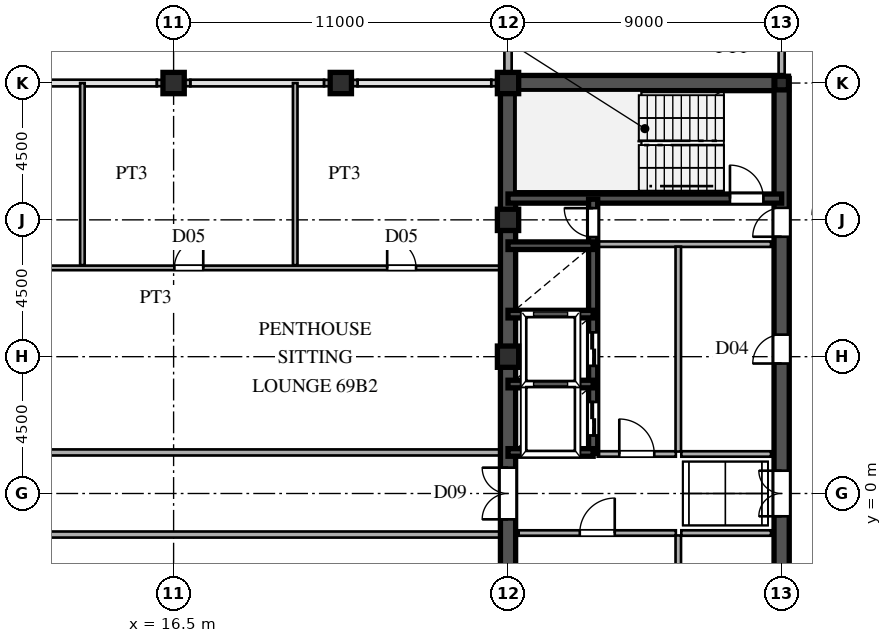
"""IFC4 building model, lengths in metres.
Left out: names, types, materials, properties, quantities, classifications, styles, units other than length and angle.
Written with IfcOpenShell. Run it as: python <this file> out.ifc"""

import sys

from ifc_helpers import new_model, si_unit, direction, frame, frame_2d, origin, origin_2d, place, context, subcontext, project, spatial, rectangle, hollow_rectangle, i_section, extrude, source, transform, mapped, element, fill, save


model = new_model("IFC4")
c1 = context("Model", 3, precision=1e-05, world=origin(), true_north=direction((0.0, 1.0)))
c2 = subcontext(c1, "Body", "Model", "MODEL_VIEW")
j1 = project(units=[si_unit("LENGTHUNIT", "METRE"), si_unit("PLANEANGLEUNIT", "RADIAN")], contexts=[c1])
p1 = place(None, origin())
s1 = spatial("IfcSite", under=j1, at=p1, CompositionType="ELEMENT")
p2 = place(p1, origin())
s2 = spatial("IfcBuilding", under=s1, at=p2, CompositionType="ELEMENT")
p3 = place(p2, frame((0.0, 0.0, 261.9)))
s3 = spatial("IfcBuildingStorey", under=s2, at=p3, CompositionType="ELEMENT", Elevation=261.9)
m1 = source(origin(), c2, "Body", "SweptSolid", [
    extrude(hollow_rectangle(XDim=0.7, YDim=0.7, WallThickness=0.03, at=origin_2d()), origin(), (0.0, 0.0, 1.0), 3.75),
])
for number, where, z_axis, x_axis in (
    (1, (27.5, 4.5, 0.0), (0.0, 0.0, 1.0), (1.0, 0.0, 0.0)),
    (2, (27.5, 9.0, 0.0), (0.0, 0.0, 1.0), (1.0, 0.0, 0.0)),
    (3, (27.5, 13.5, 0.0), (0.0, 0.0, 1.0), (1.0, 0.0, 0.0)),
):
    element("IfcColumn", number, at=place(p3, frame(where, z_axis=z_axis, x_axis=x_axis)), inside=s3, PredefinedType="COLUMN", context=c2, shape_type="MappedRepresentation", body=[
        mapped(m1, transform((0.0, 0.0, 0.0), scale=1.0)),
    ])
m2 = source(origin(), c2, "Body", "SweptSolid", [
    extrude(i_section(OverallWidth=0.45, OverallDepth=0.45, WebThickness=0.016, FlangeThickness=0.025, at=origin_2d()), origin(), (0.0, 0.0, 1.0), 3.75),
])
p4 = place(p3, frame((36.5, 13.5, 0.0), z_axis=(0.0, 0.0, 1.0), x_axis=(1.0, 0.0, 0.0)))
e4 = element("IfcColumn", 4, at=p4, inside=s3, PredefinedType="COLUMN", context=c2, shape_type="MappedRepresentation", body=[
    mapped(m2, transform((0.0, 0.0, 0.0), scale=1.0)),
])
for number, where, z_axis, x_axis in (
    (5, (16.5, 13.5, 0.0), (0.0, 0.0, 1.0), (1.0, 0.0, 0.0)),
    (6, (22.0, 13.5, 0.0), (0.0, 0.0, 1.0), (1.0, 0.0, 0.0)),
):
    element("IfcColumn", number, at=place(p3, frame(where, z_axis=z_axis, x_axis=x_axis)), inside=s3, PredefinedType="COLUMN", context=c2, shape_type="MappedRepresentation", body=[
        mapped(m1, transform((0.0, 0.0, 0.0), scale=1.0)),
    ])
p5 = place(p3, frame((27.5, 13.755, 0.0), z_axis=(0.0, 0.0, 1.0), x_axis=(0.0, 1.0, 0.0)))
e7 = element("IfcWall", 7, at=p5, inside=s3, PredefinedType="SOLIDWALL", context=c2, shape_type="SweptSolid", body=[
    extrude(rectangle(XDim=0.62, YDim=0.24, at=frame_2d((0.31, 0.0))), origin(), (0.0, 0.0, 1.0), 3.03),
])
p6 = place(p3, frame((27.5, 14.375, 0.0), z_axis=(0.0, 0.0, 1.0), x_axis=(0.0, 1.0, 0.0)))
e8 = element("IfcWall", 8, at=p6, inside=s3, PredefinedType="SOLIDWALL", context=c2, shape_type="SweptSolid", body=[
    extrude(rectangle(XDim=1.605, YDim=0.24, at=frame_2d((0.803, 0.0))), origin(), (0.0, 0.0, 1.0), 3.53),
])
for number, where, z_axis, x_axis in (
    (9, (15.95, 13.5, 0.0), (0.0, 0.0, 1.0), (1.0, 0.0, 0.0)),
    (10, (21.45, 13.5, 0.0), (0.0, 0.0, 1.0), (1.0, 0.0, 0.0)),
):
    element("IfcWall", number, at=place(p3, frame(where, z_axis=z_axis, x_axis=x_axis)), inside=s3, PredefinedType="SOLIDWALL", context=c2, shape_type="SweptSolid", body=[
        extrude(rectangle(XDim=1.1, YDim=0.21, at=frame_2d((0.55, 0.0))), origin(), (0.0, 0.0, 1.0), 3.03),
    ])
p7 = place(p3, frame((26.95, 13.5, 0.0), z_axis=(0.0, 0.0, 1.0), x_axis=(1.0, 0.0, 0.0)))
e11 = element("IfcWall", 11, at=p7, inside=s3, PredefinedType="SOLIDWALL", context=c2, shape_type="SweptSolid", body=[
    extrude(rectangle(XDim=0.54, YDim=0.21, at=frame_2d((0.27, 0.0))), origin(), (0.0, 0.0, 1.0), 3.03),
])
for number, where, z_axis, x_axis in (
    (12, (27.5, -13.5, 0.0), (0.0, 0.0, 1.0), (0.0, 1.0, 0.0)),
    (13, (27.5, 1.3, 0.0), (0.0, 0.0, 1.0), (0.0, 1.0, 0.0)),
):
    element("IfcWall", number, at=place(p3, frame(where, z_axis=z_axis, x_axis=x_axis)), inside=s3, PredefinedType="SHEAR", context=c2, shape_type="SweptSolid", body=[
        extrude(rectangle(XDim=12.2, YDim=0.5, at=frame_2d((6.1, 0.0))), origin(), (0.0, 0.0, 1.0), 3.53),
    ])
p8 = place(p3, frame((27.5, -1.3, 0.0), z_axis=(0.0, 0.0, 1.0), x_axis=(0.0, 1.0, 0.0)))
e14 = element("IfcWall", 14, at=p8, inside=s3, PredefinedType="SHEAR", context=c2, shape_type="SweptSolid", body=[
    extrude(rectangle(XDim=2.6, YDim=0.5, at=frame_2d((1.3, 0.0))), origin(), (0.0, 0.0, 1.0), 3.53),
])
p9 = place(p8, frame((0.45, 0.0, 0.0)))
e15 = element("IfcOpeningElement", 15, at=p9, cuts=e14, PredefinedType="OPENING", context=c2, shape_type="SweptSolid", body=[
    extrude(rectangle(XDim=1.7, YDim=2.35, at=frame_2d((0.85, 1.175))), frame((0.0, 0.26, 0.0), z_axis=(0.0, -1.0, 0.0), x_axis=(1.0, 0.0, 0.0)), (0.0, 0.0, 1.0), 0.52),
])
p10 = place(p3, frame((27.5, 13.5, 0.0), z_axis=(0.0, 0.0, 1.0), x_axis=(1.0, 0.0, 0.0)))
e16 = element("IfcWall", 16, at=p10, inside=s3, PredefinedType="SHEAR", context=c2, shape_type="SweptSolid", body=[
    extrude(rectangle(XDim=9.0, YDim=0.5, at=frame_2d((4.5, 0.0))), origin(), (0.0, 0.0, 1.0), 3.53),
])
p11 = place(p3, frame((36.5, -1.3, 0.0), z_axis=(0.0, 0.0, 1.0), x_axis=(0.0, 1.0, 0.0)))
e17 = element("IfcWall", 17, at=p11, inside=s3, PredefinedType="SHEAR", context=c2, shape_type="SweptSolid", body=[
    extrude(rectangle(XDim=2.6, YDim=0.5, at=frame_2d((1.3, 0.0))), origin(), (0.0, 0.0, 1.0), 3.53),
])
p12 = place(p11, frame((0.55, 0.0, 0.0)))
e18 = element("IfcOpeningElement", 18, at=p12, cuts=e17, PredefinedType="OPENING", context=c2, shape_type="SweptSolid", body=[
    extrude(rectangle(XDim=1.5, YDim=2.3, at=frame_2d((0.75, 1.15))), frame((0.0, 0.26, 0.0), z_axis=(0.0, -1.0, 0.0), x_axis=(1.0, 0.0, 0.0)), (0.0, 0.0, 1.0), 0.52),
])
p13 = place(p3, frame((36.5, 8.2, 0.0), z_axis=(0.0, 0.0, 1.0), x_axis=(0.0, 1.0, 0.0)))
e19 = element("IfcWall", 19, at=p13, inside=s3, PredefinedType="SHEAR", context=c2, shape_type="SweptSolid", body=[
    extrude(rectangle(XDim=5.45, YDim=0.5, at=frame_2d((2.725, 0.0))), origin(), (0.0, 0.0, 1.0), 3.53),
])
p14 = place(p13, frame((0.245, 0.0, 0.0)))
e20 = element("IfcOpeningElement", 20, at=p14, cuts=e19, PredefinedType="OPENING", context=c2, shape_type="SweptSolid", body=[
    extrude(rectangle(XDim=0.95, YDim=2.15, at=frame_2d((0.475, 1.075))), frame((0.0, 0.26, 0.0), z_axis=(0.0, -1.0, 0.0), x_axis=(1.0, 0.0, 0.0)), (0.0, 0.0, 1.0), 0.52),
])
p15 = place(p3, frame((36.5, -6.5, 0.0), z_axis=(0.0, 0.0, 1.0), x_axis=(0.0, 1.0, 0.0)))
e21 = element("IfcWall", 21, at=p15, inside=s3, PredefinedType="SHEAR", context=c2, shape_type="SweptSolid", body=[
    extrude(rectangle(XDim=5.2, YDim=0.5, at=frame_2d((2.6, 0.0))), origin(), (0.0, 0.0, 1.0), 3.53),
])
p16 = place(p15, frame((2.125, 0.0, 0.0)))
e22 = element("IfcOpeningElement", 22, at=p16, cuts=e21, PredefinedType="OPENING", context=c2, shape_type="SweptSolid", body=[
    extrude(rectangle(XDim=0.95, YDim=2.15, at=frame_2d((0.475, 1.075))), frame((0.0, 0.26, 0.0), z_axis=(0.0, -1.0, 0.0), x_axis=(1.0, 0.0, 0.0)), (0.0, 0.0, 1.0), 0.52),
])
p17 = place(p3, frame((36.5, 1.3, 0.0), z_axis=(0.0, 0.0, 1.0), x_axis=(0.0, 1.0, 0.0)))
e23 = element("IfcWall", 23, at=p17, inside=s3, PredefinedType="SHEAR", context=c2, shape_type="SweptSolid", body=[
    extrude(rectangle(XDim=6.9, YDim=0.5, at=frame_2d((3.45, 0.0))), origin(), (0.0, 0.0, 1.0), 3.53),
])
p18 = place(p17, frame((2.975, 0.0, 0.0)))
e24 = element("IfcOpeningElement", 24, at=p18, cuts=e23, PredefinedType="OPENING", context=c2, shape_type="SweptSolid", body=[
    extrude(rectangle(XDim=0.95, YDim=2.15, at=frame_2d((0.475, 1.075))), frame((0.0, 0.26, 0.0), z_axis=(0.0, -1.0, 0.0), x_axis=(1.0, 0.0, 0.0)), (0.0, 0.0, 1.0), 0.52),
])
p19 = place(p3, frame((27.5, 9.7, 0.0), z_axis=(0.0, 0.0, 1.0), x_axis=(1.0, 0.0, 0.0)))
e25 = element("IfcWall", 25, at=p19, inside=s3, PredefinedType="SHEAR", context=c2, shape_type="SweptSolid", body=[
    extrude(rectangle(XDim=9.0, YDim=0.3, at=frame_2d((4.5, 0.0))), origin(), (0.0, 0.0, 1.0), 3.53),
])
p20 = place(p19, frame((7.3, 0.0, 0.0)))
e26 = element("IfcOpeningElement", 26, at=p20, cuts=e25, PredefinedType="OPENING", context=c2, shape_type="SweptSolid", body=[
    extrude(rectangle(XDim=1.1, YDim=2.2, at=frame_2d((0.55, 1.1))), frame((0.0, 0.16, 0.0), z_axis=(0.0, -1.0, 0.0), x_axis=(1.0, 0.0, 0.0)), (0.0, 0.0, 1.0), 0.32),
])
for number, where, z_axis, x_axis in (
    (27, (27.5, 1.35, 0.0), (0.0, 0.0, 1.0), (1.0, 0.0, 0.0)),
    (28, (27.5, 3.6, 0.0), (0.0, 0.0, 1.0), (1.0, 0.0, 0.0)),
    (29, (27.5, 5.9, 0.0), (0.0, 0.0, 1.0), (1.0, 0.0, 0.0)),
    (30, (27.5, 8.15, 0.0), (0.0, 0.0, 1.0), (1.0, 0.0, 0.0)),
):
    element("IfcWall", number, at=place(p3, frame(where, z_axis=z_axis, x_axis=x_axis)), inside=s3, PredefinedType="SHEAR", context=c2, shape_type="SweptSolid", body=[
        extrude(rectangle(XDim=2.8, YDim=0.25, at=frame_2d((1.4, 0.0))), origin(), (0.0, 0.0, 1.0), 3.53),
    ])
p21 = place(p3, frame((30.3, 1.32, 0.0), z_axis=(0.0, 0.0, 1.0), x_axis=(0.0, 1.0, 0.0)))
e31 = element("IfcWall", 31, at=p21, inside=s3, PredefinedType="SHEAR", context=c2, shape_type="SweptSolid", body=[
    extrude(rectangle(XDim=2.28, YDim=0.3, at=frame_2d((1.14, 0.0))), origin(), (0.0, 0.0, 1.0), 3.53),
])
p22 = place(p21, frame((0.59, 0.0, 0.0)))
e32 = element("IfcOpeningElement", 32, at=p22, cuts=e31, PredefinedType="OPENING", context=c2, shape_type="SweptSolid", body=[
    extrude(rectangle(XDim=1.1, YDim=2.2, at=frame_2d((0.55, 1.1))), frame((0.0, 0.16, 0.0), z_axis=(0.0, -1.0, 0.0), x_axis=(1.0, 0.0, 0.0)), (0.0, 0.0, 1.0), 0.32),
])
p23 = place(p3, frame((30.3, 3.6, 0.0), z_axis=(0.0, 0.0, 1.0), x_axis=(0.0, 1.0, 0.0)))
e33 = element("IfcWall", 33, at=p23, inside=s3, PredefinedType="SHEAR", context=c2, shape_type="SweptSolid", body=[
    extrude(rectangle(XDim=2.3, YDim=0.3, at=frame_2d((1.15, 0.0))), origin(), (0.0, 0.0, 1.0), 3.53),
])
p24 = place(p23, frame((0.6, 0.0, 0.0)))
e34 = element("IfcOpeningElement", 34, at=p24, cuts=e33, PredefinedType="OPENING", context=c2, shape_type="SweptSolid", body=[
    extrude(rectangle(XDim=1.1, YDim=2.2, at=frame_2d((0.55, 1.1))), frame((0.0, 0.16, 0.0), z_axis=(0.0, -1.0, 0.0), x_axis=(1.0, 0.0, 0.0)), (0.0, 0.0, 1.0), 0.32),
])
p25 = place(p3, frame((30.3, 5.9, 0.0), z_axis=(0.0, 0.0, 1.0), x_axis=(0.0, 1.0, 0.0)))
e35 = element("IfcWall", 35, at=p25, inside=s3, PredefinedType="SHEAR", context=c2, shape_type="SweptSolid", body=[
    extrude(rectangle(XDim=2.25, YDim=0.3, at=frame_2d((1.125, 0.0))), origin(), (0.0, 0.0, 1.0), 3.53),
])
p26 = place(p3, frame((30.3, 8.15, 0.0), z_axis=(0.0, 0.0, 1.0), x_axis=(0.0, 1.0, 0.0)))
e36 = element("IfcWall", 36, at=p26, inside=s3, PredefinedType="SHEAR", context=c2, shape_type="SweptSolid", body=[
    extrude(rectangle(XDim=1.53, YDim=0.3, at=frame_2d((0.765, 0.0))), origin(), (0.0, 0.0, 1.0), 3.53),
])
p27 = place(p26, frame((0.285, 0.0, 0.0)))
e37 = element("IfcOpeningElement", 37, at=p27, cuts=e36, PredefinedType="OPENING", context=c2, shape_type="SweptSolid", body=[
    extrude(rectangle(XDim=0.95, YDim=2.15, at=frame_2d((0.475, 1.075))), frame((0.0, 0.16, 0.0), z_axis=(0.0, -1.0, 0.0), x_axis=(1.0, 0.0, 0.0)), (0.0, 0.0, 1.0), 0.32),
])
p28 = place(p3, frame((30.45, 8.2, 0.0), z_axis=(0.0, 0.0, 1.0), x_axis=(1.0, 0.0, 0.0)))
e38 = element("IfcWall", 38, at=p28, inside=s3, PredefinedType="PARTITIONING", context=c2, shape_type="SweptSolid", body=[
    extrude(rectangle(XDim=5.7, YDim=0.18, at=frame_2d((2.85, 0.0))), origin(), (0.0, 0.0, 1.0), 3.53),
])
p29 = place(p3, frame((33.1, -6.42, 0.0), z_axis=(0.0, 0.0, 1.0), x_axis=(0.0, 1.0, 0.0)))
e39 = element("IfcWall", 39, at=p29, inside=s3, PredefinedType="PARTITIONING", context=c2, shape_type="SweptSolid", body=[
    extrude(rectangle(XDim=5.04, YDim=0.18, at=frame_2d((2.52, 0.0))), origin(), (0.0, 0.0, 1.0), 3.53),
])
p30 = place(p3, frame((33.1, 1.38, 0.0), z_axis=(0.0, 0.0, 1.0), x_axis=(0.0, 1.0, 0.0)))
e40 = element("IfcWall", 40, at=p30, inside=s3, PredefinedType="PARTITIONING", context=c2, shape_type="SweptSolid", body=[
    extrude(rectangle(XDim=6.74, YDim=0.18, at=frame_2d((3.37, 0.0))), origin(), (0.0, 0.0, 1.0), 3.53),
])
p31 = place(p3, frame((27.85, -1.3, 0.0), z_axis=(0.0, 0.0, 1.0), x_axis=(1.0, 0.0, 0.0)))
e41 = element("IfcWall", 41, at=p31, inside=s3, PredefinedType="PARTITIONING", context=c2, shape_type="SweptSolid", body=[
    extrude(rectangle(XDim=5.17, YDim=0.18, at=frame_2d((2.585, 0.0))), origin(), (0.0, 0.0, 1.0), 3.53),
])
p32 = place(p31, frame((2.01, 0.0, 0.0)))
e42 = element("IfcOpeningElement", 42, at=p32, cuts=e41, PredefinedType="OPENING", context=c2, shape_type="SweptSolid", body=[
    extrude(rectangle(XDim=1.15, YDim=2.2, at=frame_2d((0.575, 1.1))), frame((0.0, 0.1, 0.0), z_axis=(0.0, -1.0, 0.0), x_axis=(1.0, 0.0, 0.0)), (0.0, 0.0, 1.0), 0.2),
])
p33 = place(p3, frame((30.45, 1.3, 0.0), z_axis=(0.0, 0.0, 1.0), x_axis=(1.0, 0.0, 0.0)))
e43 = element("IfcWall", 43, at=p33, inside=s3, PredefinedType="PARTITIONING", context=c2, shape_type="SweptSolid", body=[
    extrude(rectangle(XDim=2.57, YDim=0.18, at=frame_2d((1.285, 0.0))), origin(), (0.0, 0.0, 1.0), 3.53),
])
p34 = place(p33, frame((0.71, 0.0, 0.0)))
e44 = element("IfcOpeningElement", 44, at=p34, cuts=e43, PredefinedType="OPENING", context=c2, shape_type="SweptSolid", body=[
    extrude(rectangle(XDim=1.15, YDim=2.2, at=frame_2d((0.575, 1.1))), frame((0.0, 0.1, 0.0), z_axis=(0.0, -1.0, 0.0), x_axis=(1.0, 0.0, 0.0)), (0.0, 0.0, 1.0), 0.2),
])
for number, where, z_axis, x_axis in (
    (45, (33.2, -1.3, 0.0), (0.0, 0.0, 1.0), (1.0, 0.0, 0.0)),
    (46, (33.2, 1.3, 0.0), (0.0, 0.0, 1.0), (1.0, 0.0, 0.0)),
):
    element("IfcWall", number, at=place(p3, frame(where, z_axis=z_axis, x_axis=x_axis)), inside=s3, PredefinedType="PARTITIONING", context=c2, shape_type="SweptSolid", body=[
        extrude(rectangle(XDim=2.95, YDim=0.18, at=frame_2d((1.475, 0.0))), origin(), (0.0, 0.0, 1.0), 3.53),
    ])
p35 = place(p3, frame((-27.245, -1.35, 0.0), z_axis=(0.0, 0.0, 1.0), x_axis=(1.0, 0.0, 0.0)))
e47 = element("IfcWall", 47, at=p35, inside=s3, PredefinedType="PARTITIONING", context=c2, shape_type="SweptSolid", body=[
    extrude(rectangle(XDim=54.49, YDim=0.2, at=frame_2d((27.245, 0.0))), origin(), (0.0, 0.0, 1.0), 3.53),
])
p36 = place(p35, frame((22.47, 0.0, 0.0)))
e48 = element("IfcOpeningElement", 48, at=p36, cuts=e47, PredefinedType="OPENING", context=c2, shape_type="SweptSolid", body=[
    extrude(rectangle(XDim=1.05, YDim=2.25, at=frame_2d((0.525, 1.125))), frame((0.0, 0.11, 0.0), z_axis=(0.0, -1.0, 0.0), x_axis=(1.0, 0.0, 0.0)), (0.0, 0.0, 1.0), 0.22),
])
p37 = place(p3, frame((-27.245, 1.35, 0.0), z_axis=(0.0, 0.0, 1.0), x_axis=(1.0, 0.0, 0.0)))
e49 = element("IfcWall", 49, at=p37, inside=s3, PredefinedType="PARTITIONING", context=c2, shape_type="SweptSolid", body=[
    extrude(rectangle(XDim=54.49, YDim=0.2, at=frame_2d((27.245, 0.0))), origin(), (0.0, 0.0, 1.0), 3.53),
])
p38 = place(p37, frame((22.47, 0.0, 0.0)))
e50 = element("IfcOpeningElement", 50, at=p38, cuts=e49, PredefinedType="OPENING", context=c2, shape_type="SweptSolid", body=[
    extrude(rectangle(XDim=1.05, YDim=2.25, at=frame_2d((0.525, 1.125))), frame((0.0, 0.11, 0.0), z_axis=(0.0, -1.0, 0.0), x_axis=(1.0, 0.0, 0.0)), (0.0, 0.0, 1.0), 0.22),
])
p39 = place(p3, frame((4.585, 7.42, 0.0), z_axis=(0.0, 0.0, 1.0), x_axis=(1.0, 0.0, 0.0)))
e51 = element("IfcWall", 51, at=p39, inside=s3, PredefinedType="PARTITIONING", context=c2, shape_type="SweptSolid", body=[
    extrude(rectangle(XDim=22.66, YDim=0.15, at=frame_2d((11.33, 0.0))), origin(), (0.0, 0.0, 1.0), 3.53),
])
p40 = place(p39, frame((3.94, 0.0, 0.0)))
e52 = element("IfcOpeningElement", 52, at=p40, cuts=e51, PredefinedType="OPENING", context=c2, shape_type="SweptSolid", body=[
    extrude(rectangle(XDim=0.95, YDim=2.15, at=frame_2d((0.475, 1.075))), frame((0.0, 0.085, 0.0), z_axis=(0.0, -1.0, 0.0), x_axis=(1.0, 0.0, 0.0)), (0.0, 0.0, 1.0), 0.17),
])
p41 = place(p39, frame((11.94, 0.0, 0.0)))
e53 = element("IfcOpeningElement", 53, at=p41, cuts=e51, PredefinedType="OPENING", context=c2, shape_type="SweptSolid", body=[
    extrude(rectangle(XDim=0.95, YDim=2.15, at=frame_2d((0.475, 1.075))), frame((0.0, 0.085, 0.0), z_axis=(0.0, -1.0, 0.0), x_axis=(1.0, 0.0, 0.0)), (0.0, 0.0, 1.0), 0.17),
])
p42 = place(p39, frame((18.94, 0.0, 0.0)))
e54 = element("IfcOpeningElement", 54, at=p42, cuts=e51, PredefinedType="OPENING", context=c2, shape_type="SweptSolid", body=[
    extrude(rectangle(XDim=0.95, YDim=2.15, at=frame_2d((0.475, 1.075))), frame((0.0, 0.085, 0.0), z_axis=(0.0, -1.0, 0.0), x_axis=(1.0, 0.0, 0.0)), (0.0, 0.0, 1.0), 0.17),
])
for number, where, z_axis, x_axis in (
    (55, (13.5, 7.51, 0.0), (0.0, 0.0, 1.0), (0.0, 1.0, 0.0)),
    (56, (20.5, 7.51, 0.0), (0.0, 0.0, 1.0), (0.0, 1.0, 0.0)),
):
    element("IfcWall", number, at=place(p3, frame(where, z_axis=z_axis, x_axis=x_axis)), inside=s3, PredefinedType="PARTITIONING", context=c2, shape_type="SweptSolid", body=[
        extrude(rectangle(XDim=5.99, YDim=0.15, at=frame_2d((2.995, 0.0))), origin(), (0.0, 0.0, 1.0), 3.53),
    ])
p43 = place(p3, frame((36.5, 13.755, 0.0), z_axis=(0.0, 0.0, 1.0), x_axis=(0.0, 1.0, 0.0)))
e57 = element("IfcWall", 57, at=p43, inside=s3, PredefinedType="PARTITIONING", context=c2, shape_type="SweptSolid", body=[
    extrude(rectangle(XDim=1.76, YDim=0.2, at=frame_2d((0.88, 0.0))), origin(), (0.0, 0.0, 1.0), 2.93),
])
m3 = source(origin(), c2, "Body", "SweptSolid", [
    extrude(rectangle(XDim=1.7, YDim=2.35, at=frame_2d((0.85, 1.175))), frame((0.0, 0.025, 0.0), z_axis=(0.0, -1.0, 0.0), x_axis=(1.0, 0.0, 0.0)), (0.0, 0.0, 1.0), 0.05),
])
p44 = place(p9, origin())
e58 = element("IfcDoor", 58, at=p44, inside=s3, OperationType="DOUBLE_SWING_LEFT", PredefinedType="DOOR", context=c2, shape_type="MappedRepresentation", body=[
    mapped(m3, transform((0.0, 0.0, 0.0), scale=1.0)),
])
fill(e15, e58)
m4 = source(origin(), c2, "Body", "SweptSolid", [
    extrude(rectangle(XDim=1.5, YDim=2.3, at=frame_2d((0.75, 1.15))), frame((0.0, 0.025, 0.0), z_axis=(0.0, -1.0, 0.0), x_axis=(1.0, 0.0, 0.0)), (0.0, 0.0, 1.0), 0.05),
])
p45 = place(p12, origin())
e59 = element("IfcDoor", 59, at=p45, inside=s3, OperationType="DOUBLE_SWING_LEFT", PredefinedType="DOOR", context=c2, shape_type="MappedRepresentation", body=[
    mapped(m4, transform((0.0, 0.0, 0.0), scale=1.0)),
])
fill(e18, e59)
m5 = source(origin(), c2, "Body", "SweptSolid", [
    extrude(rectangle(XDim=0.95, YDim=2.15, at=frame_2d((0.475, 1.075))), frame((0.0, 0.025, 0.0), z_axis=(0.0, -1.0, 0.0), x_axis=(1.0, 0.0, 0.0)), (0.0, 0.0, 1.0), 0.05),
])
p46 = place(p14, origin())
e60 = element("IfcDoor", 60, at=p46, inside=s3, OperationType="SINGLE_SWING_LEFT", PredefinedType="DOOR", context=c2, shape_type="MappedRepresentation", body=[
    mapped(m5, transform((0.0, 0.0, 0.0), scale=1.0)),
])
fill(e20, e60)
p47 = place(p18, origin())
e61 = element("IfcDoor", 61, at=p47, inside=s3, OperationType="SINGLE_SWING_LEFT", PredefinedType="DOOR", context=c2, shape_type="MappedRepresentation", body=[
    mapped(m5, transform((0.0, 0.0, 0.0), scale=1.0)),
])
fill(e24, e61)
m6 = source(origin(), c2, "Body", "SweptSolid", [
    extrude(rectangle(XDim=1.1, YDim=2.2, at=frame_2d((0.55, 1.1))), frame((0.0, 0.025, 0.0), z_axis=(0.0, -1.0, 0.0), x_axis=(1.0, 0.0, 0.0)), (0.0, 0.0, 1.0), 0.05),
])
p48 = place(p20, origin())
e62 = element("IfcDoor", 62, at=p48, inside=s3, OperationType="SINGLE_SWING_LEFT", PredefinedType="DOOR", context=c2, shape_type="MappedRepresentation", body=[
    mapped(m6, transform((0.0, 0.0, 0.0), scale=1.0)),
])
fill(e26, e62)
m7 = source(origin(), c2, "Body", "SweptSolid", [
    extrude(rectangle(XDim=1.1, YDim=2.2, at=frame_2d((0.55, 1.1))), frame((0.0, 0.025, 0.0), z_axis=(0.0, -1.0, 0.0), x_axis=(1.0, 0.0, 0.0)), (0.0, 0.0, 1.0), 0.05),
])
p49 = place(p22, origin())
e63 = element("IfcDoor", 63, at=p49, inside=s3, OperationType="DOUBLE_DOOR_SLIDING", PredefinedType="DOOR", context=c2, shape_type="MappedRepresentation", body=[
    mapped(m7, transform((0.0, 0.0, 0.0), scale=1.0)),
])
fill(e32, e63)
p50 = place(p24, origin())
e64 = element("IfcDoor", 64, at=p50, inside=s3, OperationType="DOUBLE_DOOR_SLIDING", PredefinedType="DOOR", context=c2, shape_type="MappedRepresentation", body=[
    mapped(m7, transform((0.0, 0.0, 0.0), scale=1.0)),
])
fill(e34, e64)
p51 = place(p27, origin())
e65 = element("IfcDoor", 65, at=p51, inside=s3, OperationType="SINGLE_SWING_RIGHT", PredefinedType="DOOR", context=c2, shape_type="MappedRepresentation", body=[
    mapped(m5, transform((0.0, 0.0, 0.0), scale=1.0)),
])
fill(e37, e65)
m8 = source(origin(), c2, "Body", "SweptSolid", [
    extrude(rectangle(XDim=1.15, YDim=2.2, at=frame_2d((0.575, 1.1))), frame((0.0, 0.025, 0.0), z_axis=(0.0, -1.0, 0.0), x_axis=(1.0, 0.0, 0.0)), (0.0, 0.0, 1.0), 0.05),
])
p52 = place(p32, origin())
e66 = element("IfcDoor", 66, at=p52, inside=s3, OperationType="SINGLE_SWING_RIGHT", PredefinedType="DOOR", context=c2, shape_type="MappedRepresentation", body=[
    mapped(m8, transform((0.0, 0.0, 0.0), scale=1.0)),
])
fill(e42, e66)
p53 = place(p34, origin())
e67 = element("IfcDoor", 67, at=p53, inside=s3, OperationType="SINGLE_SWING_LEFT", PredefinedType="DOOR", context=c2, shape_type="MappedRepresentation", body=[
    mapped(m8, transform((0.0, 0.0, 0.0), scale=1.0)),
])
fill(e44, e67)
m9 = source(origin(), c2, "Body", "SweptSolid", [
    extrude(rectangle(XDim=0.95, YDim=2.15, at=frame_2d((0.475, 1.075))), frame((0.0, 0.025, 0.0), z_axis=(0.0, -1.0, 0.0), x_axis=(1.0, 0.0, 0.0)), (0.0, 0.0, 1.0), 0.05),
])
p54 = place(p41, origin())
e68 = element("IfcDoor", 68, at=p54, inside=s3, OperationType="SINGLE_SWING_RIGHT", PredefinedType="DOOR", context=c2, shape_type="MappedRepresentation", body=[
    mapped(m9, transform((0.0, 0.0, 0.0), scale=1.0)),
])
fill(e53, e68)
p55 = place(p42, origin())
e69 = element("IfcDoor", 69, at=p55, inside=s3, OperationType="SINGLE_SWING_LEFT", PredefinedType="DOOR", context=c2, shape_type="MappedRepresentation", body=[
    mapped(m9, transform((0.0, 0.0, 0.0), scale=1.0)),
])
fill(e54, e69)
save(model, sys.argv[1])
